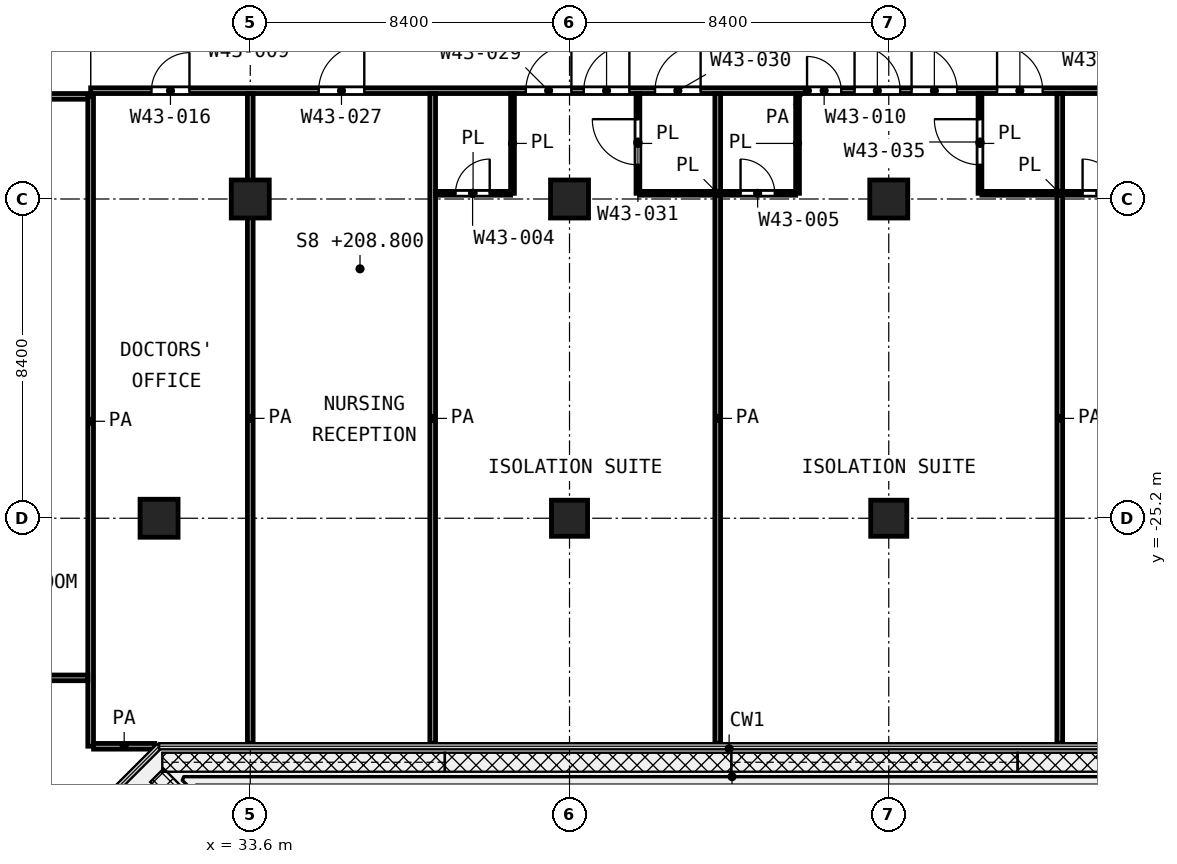
"""IFC4 building model, lengths in metres.
Left out: names, types, materials, properties, quantities, classifications, styles, units other than length and angle.
Written with IfcOpenShell. Run it as: python <this file> out.ifc"""

import sys

from ifc_helpers import new_model, si_unit, direction, frame, frame_2d, origin, origin_2d, place, context, subcontext, project, spatial, rectangle, extrude, element, fill, save


model = new_model("IFC4")
c1 = context("Model", 3, precision=1e-05, world=origin(), true_north=direction((0.0, 1.0)))
c2 = subcontext(c1, "Body", "Model", "MODEL_VIEW")
j1 = project(units=[si_unit("LENGTHUNIT", "METRE"), si_unit("PLANEANGLEUNIT", "RADIAN")], contexts=[c1])
p1 = place(None, origin())
s1 = spatial("IfcSite", under=j1, at=p1, CompositionType="ELEMENT")
p2 = place(p1, origin())
s2 = spatial("IfcBuilding", under=s1, at=p2, CompositionType="ELEMENT")
p3 = place(p2, frame((0.0, 0.0, 208.8)))
s3 = spatial("IfcBuildingStorey", under=s2, at=p3, CompositionType="ELEMENT", Elevation=208.8)
for number, where, z_axis, x_axis in (
    (1, (33.6, -16.8, 0.0), (0.0, 0.0, 1.0), (1.0, 0.0, 0.0)),
    (2, (42.0, -16.8, 0.0), (0.0, 0.0, 1.0), (1.0, 0.0, 0.0)),
    (3, (50.4, -16.8, 0.0), (0.0, 0.0, 1.0), (1.0, 0.0, 0.0)),
    (4, (31.2, -25.2, 0.0), (0.0, 0.0, 1.0), (1.0, 0.0, 0.0)),
):
    element("IfcColumn", number, at=place(p3, frame(where, z_axis=z_axis, x_axis=x_axis)), inside=s3, PredefinedType="COLUMN", context=c2, shape_type="SweptSolid", body=[
        extrude(rectangle(XDim=1.0, YDim=1.0, at=origin_2d()), origin(), (0.0, 0.0, 1.0), 4.2),
    ])
for number, where, z_axis, x_axis in (
    (5, (42.0, -25.2, 0.0), (0.0, 0.0, 1.0), (1.0, 0.0, 0.0)),
    (6, (50.4, -25.2, 0.0), (0.0, 0.0, 1.0), (1.0, 0.0, 0.0)),
):
    element("IfcColumn", number, at=place(p3, frame(where, z_axis=z_axis, x_axis=x_axis)), inside=s3, PredefinedType="COLUMN", context=c2, shape_type="SweptSolid", body=[
        extrude(rectangle(XDim=0.95, YDim=0.95, at=origin_2d()), origin(), (0.0, 0.0, 1.0), 4.2),
    ])
p4 = place(p3, frame((38.475, -16.65, 0.0), z_axis=(0.0, 0.0, 1.0), x_axis=(1.0, 0.0, 0.0)))
e7 = element("IfcWall", 7, at=p4, inside=s3, PredefinedType="PARTITIONING", context=c2, shape_type="SweptSolid", body=[
    extrude(rectangle(XDim=1.975, YDim=0.1, at=frame_2d((0.987, 0.0))), origin(), (0.0, 0.0, 1.0), 3.7),
])
p5 = place(p4, frame((0.525, 0.0, 0.0)))
e8 = element("IfcOpeningElement", 8, at=p5, cuts=e7, PredefinedType="OPENING", context=c2, shape_type="SweptSolid", body=[
    extrude(rectangle(XDim=0.9, YDim=2.1, at=frame_2d((0.45, 1.05))), frame((0.0, 0.06, 0.0), z_axis=(0.0, -1.0, 0.0), x_axis=(1.0, 0.0, 0.0)), (0.0, 0.0, 1.0), 0.12),
])
p6 = place(p3, frame((43.85, -16.65, 0.0), z_axis=(0.0, 0.0, 1.0), x_axis=(1.0, 0.0, 0.0)))
e9 = element("IfcWall", 9, at=p6, inside=s3, PredefinedType="PARTITIONING", context=c2, shape_type="SweptSolid", body=[
    extrude(rectangle(XDim=4.1, YDim=0.1, at=frame_2d((2.05, 0.0))), origin(), (0.0, 0.0, 1.0), 3.7),
])
p7 = place(p6, frame((2.65, 0.0, 0.0)))
e10 = element("IfcOpeningElement", 10, at=p7, cuts=e9, PredefinedType="OPENING", context=c2, shape_type="SweptSolid", body=[
    extrude(rectangle(XDim=0.9, YDim=2.1, at=frame_2d((0.45, 1.05))), frame((0.0, 0.06, 0.0), z_axis=(0.0, -1.0, 0.0), x_axis=(1.0, 0.0, 0.0)), (0.0, 0.0, 1.0), 0.12),
])
p8 = place(p3, frame((52.85, -16.65, 0.0), z_axis=(0.0, 0.0, 1.0), x_axis=(1.0, 0.0, 0.0)))
e11 = element("IfcWall", 11, at=p8, inside=s3, PredefinedType="PARTITIONING", context=c2, shape_type="SweptSolid", body=[
    extrude(rectangle(XDim=4.1, YDim=0.1, at=frame_2d((2.05, 0.0))), origin(), (0.0, 0.0, 1.0), 3.7),
])
p9 = place(p8, frame((2.65, 0.0, 0.0)))
e12 = element("IfcOpeningElement", 12, at=p9, cuts=e11, PredefinedType="OPENING", context=c2, shape_type="SweptSolid", body=[
    extrude(rectangle(XDim=0.9, YDim=2.1, at=frame_2d((0.45, 1.05))), frame((0.0, 0.06, 0.0), z_axis=(0.0, -1.0, 0.0), x_axis=(1.0, 0.0, 0.0)), (0.0, 0.0, 1.0), 0.12),
])
p10 = place(p3, frame((40.5, -16.65, 0.0), z_axis=(0.0, 0.0, 1.0), x_axis=(0.0, 1.0, 0.0)))
e13 = element("IfcWall", 13, at=p10, inside=s3, PredefinedType="PARTITIONING", context=c2, shape_type="SweptSolid", body=[
    extrude(rectangle(XDim=2.625, YDim=0.1, at=frame_2d((1.312, 0.0))), origin(), (0.0, 0.0, 1.0), 3.7),
])
p11 = place(p3, frame((43.8, -16.65, 0.0), z_axis=(0.0, 0.0, 1.0), x_axis=(0.0, 1.0, 0.0)))
e14 = element("IfcWall", 14, at=p11, inside=s3, PredefinedType="PARTITIONING", context=c2, shape_type="SweptSolid", body=[
    extrude(rectangle(XDim=2.625, YDim=0.1, at=frame_2d((1.312, 0.0))), origin(), (0.0, 0.0, 1.0), 3.7),
])
p12 = place(p11, frame((0.75, 0.0, 0.0)))
e15 = element("IfcOpeningElement", 15, at=p12, cuts=e14, PredefinedType="OPENING", context=c2, shape_type="SweptSolid", body=[
    extrude(rectangle(XDim=1.2, YDim=2.1, at=frame_2d((0.6, 1.05))), frame((0.0, 0.06, 0.0), z_axis=(0.0, -1.0, 0.0), x_axis=(1.0, 0.0, 0.0)), (0.0, 0.0, 1.0), 0.12),
])
p13 = place(p3, frame((48.0, -16.65, 0.0), z_axis=(0.0, 0.0, 1.0), x_axis=(0.0, 1.0, 0.0)))
e16 = element("IfcWall", 16, at=p13, inside=s3, PredefinedType="PARTITIONING", context=c2, shape_type="SweptSolid", body=[
    extrude(rectangle(XDim=2.625, YDim=0.1, at=frame_2d((1.312, 0.0))), origin(), (0.0, 0.0, 1.0), 3.7),
])
p14 = place(p3, frame((52.8, -16.65, 0.0), z_axis=(0.0, 0.0, 1.0), x_axis=(0.0, 1.0, 0.0)))
e17 = element("IfcWall", 17, at=p14, inside=s3, PredefinedType="PARTITIONING", context=c2, shape_type="SweptSolid", body=[
    extrude(rectangle(XDim=2.625, YDim=0.1, at=frame_2d((1.312, 0.0))), origin(), (0.0, 0.0, 1.0), 3.7),
])
p15 = place(p14, frame((0.75, 0.0, 0.0)))
e18 = element("IfcOpeningElement", 18, at=p15, cuts=e17, PredefinedType="OPENING", context=c2, shape_type="SweptSolid", body=[
    extrude(rectangle(XDim=1.2, YDim=2.1, at=frame_2d((0.6, 1.05))), frame((0.0, 0.06, 0.0), z_axis=(0.0, -1.0, 0.0), x_axis=(1.0, 0.0, 0.0)), (0.0, 0.0, 1.0), 0.12),
])
p16 = place(p3, frame((29.477, -31.2, 0.0), z_axis=(0.0, 0.0, 1.0), x_axis=(1.0, 0.0, 0.0)))
e19 = element("IfcWall", 19, at=p16, inside=s3, PredefinedType="PARTITIONING", context=c2, shape_type="SweptSolid", body=[
    extrude(rectangle(XDim=1.61, YDim=0.15, at=frame_2d((0.805, 0.0))), origin(), (0.0, 0.0, 1.0), 3.7),
])
p17 = place(p3, frame((14.175, -29.4, 0.0), z_axis=(0.0, 0.0, 1.0), x_axis=(1.0, 0.0, 0.0)))
e20 = element("IfcWall", 20, at=p17, inside=s3, PredefinedType="PARTITIONING", context=c2, shape_type="SweptSolid", body=[
    extrude(rectangle(XDim=15.15, YDim=0.15, at=frame_2d((7.575, 0.0))), origin(), (0.0, 0.0, 1.0), 3.7),
])
p18 = place(p3, frame((24.9, -14.1, 0.0), z_axis=(0.0, 0.0, 1.0), x_axis=(1.0, 0.0, 0.0)))
e21 = element("IfcWall", 21, at=p18, inside=s3, PredefinedType="PARTITIONING", context=c2, shape_type="SweptSolid", body=[
    extrude(rectangle(XDim=4.425, YDim=0.15, at=frame_2d((2.212, 0.0))), origin(), (0.0, 0.0, 1.0), 3.7),
])
p19 = place(p18, frame((1.65, 0.0, 0.0)))
e22 = element("IfcOpeningElement", 22, at=p19, cuts=e21, PredefinedType="OPENING", context=c2, shape_type="SweptSolid", body=[
    extrude(rectangle(XDim=1.5, YDim=2.1, at=frame_2d((0.75, 1.05))), frame((0.0, 0.085, 0.0), z_axis=(0.0, -1.0, 0.0), x_axis=(1.0, 0.0, 0.0)), (0.0, 0.0, 1.0), 0.17),
])
p20 = place(p3, frame((29.4, -13.95, 0.0), z_axis=(0.0, 0.0, 1.0), x_axis=(1.0, 0.0, 0.0)))
e23 = element("IfcWall", 23, at=p20, inside=s3, PredefinedType="PARTITIONING", context=c2, shape_type="SweptSolid", body=[
    extrude(rectangle(XDim=37.72, YDim=0.15, at=frame_2d((18.86, 0.0))), origin(), (0.0, 0.0, 1.0), 3.7),
])
p21 = place(p20, frame((1.6, 0.0, 0.0)))
e24 = element("IfcOpeningElement", 24, at=p21, cuts=e23, PredefinedType="OPENING", context=c2, shape_type="SweptSolid", body=[
    extrude(rectangle(XDim=1.0, YDim=2.1, at=frame_2d((0.5, 1.05))), frame((0.0, 0.085, 0.0), z_axis=(0.0, -1.0, 0.0), x_axis=(1.0, 0.0, 0.0)), (0.0, 0.0, 1.0), 0.17),
])
p22 = place(p20, frame((6.0, 0.0, 0.0)))
e25 = element("IfcOpeningElement", 25, at=p22, cuts=e23, PredefinedType="OPENING", context=c2, shape_type="SweptSolid", body=[
    extrude(rectangle(XDim=1.2, YDim=2.1, at=frame_2d((0.6, 1.05))), frame((0.0, 0.085, 0.0), z_axis=(0.0, -1.0, 0.0), x_axis=(1.0, 0.0, 0.0)), (0.0, 0.0, 1.0), 0.17),
])
p23 = place(p20, frame((12.975, 0.0, 0.0)))
e26 = element("IfcOpeningElement", 26, at=p23, cuts=e23, PredefinedType="OPENING", context=c2, shape_type="SweptSolid", body=[
    extrude(rectangle(XDim=1.2, YDim=2.1, at=frame_2d((0.6, 1.05))), frame((0.0, 0.085, 0.0), z_axis=(0.0, -1.0, 0.0), x_axis=(1.0, 0.0, 0.0)), (0.0, 0.0, 1.0), 0.17),
])
p24 = place(p20, frame((11.45, 0.0, 0.0)))
e27 = element("IfcOpeningElement", 27, at=p24, cuts=e23, PredefinedType="OPENING", context=c2, shape_type="SweptSolid", body=[
    extrude(rectangle(XDim=1.2, YDim=2.1, at=frame_2d((0.6, 1.05))), frame((0.0, 0.085, 0.0), z_axis=(0.0, -1.0, 0.0), x_axis=(1.0, 0.0, 0.0)), (0.0, 0.0, 1.0), 0.17),
])
p25 = place(p20, frame((14.85, 0.0, 0.0)))
e28 = element("IfcOpeningElement", 28, at=p25, cuts=e23, PredefinedType="OPENING", context=c2, shape_type="SweptSolid", body=[
    extrude(rectangle(XDim=1.2, YDim=2.1, at=frame_2d((0.6, 1.05))), frame((0.0, 0.085, 0.0), z_axis=(0.0, -1.0, 0.0), x_axis=(1.0, 0.0, 0.0)), (0.0, 0.0, 1.0), 0.17),
])
p26 = place(p20, frame((21.6, 0.0, 0.0)))
e29 = element("IfcOpeningElement", 29, at=p26, cuts=e23, PredefinedType="OPENING", context=c2, shape_type="SweptSolid", body=[
    extrude(rectangle(XDim=1.2, YDim=2.1, at=frame_2d((0.6, 1.05))), frame((0.0, 0.085, 0.0), z_axis=(0.0, -1.0, 0.0), x_axis=(1.0, 0.0, 0.0)), (0.0, 0.0, 1.0), 0.17),
])
p27 = place(p20, frame((20.1, 0.0, 0.0)))
e30 = element("IfcOpeningElement", 30, at=p27, cuts=e23, PredefinedType="OPENING", context=c2, shape_type="SweptSolid", body=[
    extrude(rectangle(XDim=1.2, YDim=2.1, at=frame_2d((0.6, 1.05))), frame((0.0, 0.085, 0.0), z_axis=(0.0, -1.0, 0.0), x_axis=(1.0, 0.0, 0.0)), (0.0, 0.0, 1.0), 0.17),
])
p28 = place(p20, frame((18.85, 0.0, 0.0)))
e31 = element("IfcOpeningElement", 31, at=p28, cuts=e23, PredefinedType="OPENING", context=c2, shape_type="SweptSolid", body=[
    extrude(rectangle(XDim=0.9, YDim=2.1, at=frame_2d((0.45, 1.05))), frame((0.0, 0.085, 0.0), z_axis=(0.0, -1.0, 0.0), x_axis=(1.0, 0.0, 0.0)), (0.0, 0.0, 1.0), 0.17),
])
p29 = place(p20, frame((23.85, 0.0, 0.0)))
e32 = element("IfcOpeningElement", 32, at=p29, cuts=e23, PredefinedType="OPENING", context=c2, shape_type="SweptSolid", body=[
    extrude(rectangle(XDim=1.2, YDim=2.1, at=frame_2d((0.6, 1.05))), frame((0.0, 0.085, 0.0), z_axis=(0.0, -1.0, 0.0), x_axis=(1.0, 0.0, 0.0)), (0.0, 0.0, 1.0), 0.17),
])
p30 = place(p20, frame((29.475, 0.0, 0.0)))
e33 = element("IfcOpeningElement", 33, at=p30, cuts=e23, PredefinedType="OPENING", context=c2, shape_type="SweptSolid", body=[
    extrude(rectangle(XDim=1.2, YDim=2.1, at=frame_2d((0.6, 1.05))), frame((0.0, 0.085, 0.0), z_axis=(0.0, -1.0, 0.0), x_axis=(1.0, 0.0, 0.0)), (0.0, 0.0, 1.0), 0.17),
])
p31 = place(p20, frame((27.95, 0.0, 0.0)))
e34 = element("IfcOpeningElement", 34, at=p31, cuts=e23, PredefinedType="OPENING", context=c2, shape_type="SweptSolid", body=[
    extrude(rectangle(XDim=1.2, YDim=2.1, at=frame_2d((0.6, 1.05))), frame((0.0, 0.085, 0.0), z_axis=(0.0, -1.0, 0.0), x_axis=(1.0, 0.0, 0.0)), (0.0, 0.0, 1.0), 0.17),
])
p32 = place(p20, frame((31.35, 0.0, 0.0)))
e35 = element("IfcOpeningElement", 35, at=p32, cuts=e23, PredefinedType="OPENING", context=c2, shape_type="SweptSolid", body=[
    extrude(rectangle(XDim=1.2, YDim=2.1, at=frame_2d((0.6, 1.05))), frame((0.0, 0.085, 0.0), z_axis=(0.0, -1.0, 0.0), x_axis=(1.0, 0.0, 0.0)), (0.0, 0.0, 1.0), 0.17),
])
p33 = place(p20, frame((34.9, 0.0, 0.0)))
e36 = element("IfcOpeningElement", 36, at=p33, cuts=e23, PredefinedType="OPENING", context=c2, shape_type="SweptSolid", body=[
    extrude(rectangle(XDim=1.0, YDim=2.1, at=frame_2d((0.5, 1.05))), frame((0.0, 0.085, 0.0), z_axis=(0.0, -1.0, 0.0), x_axis=(1.0, 0.0, 0.0)), (0.0, 0.0, 1.0), 0.17),
])
p34 = place(p3, frame((29.4, -31.198, 0.0), z_axis=(0.0, 0.0, 1.0), x_axis=(0.0, 1.0, 0.0)))
e37 = element("IfcWall", 37, at=p34, inside=s3, PredefinedType="PARTITIONING", context=c2, shape_type="SweptSolid", body=[
    extrude(rectangle(XDim=17.098, YDim=0.15, at=frame_2d((8.549, 0.0))), origin(), (0.0, 0.0, 1.0), 3.7),
])
for number, where, z_axis, x_axis in (
    (38, (33.6, -31.12, 0.0), (0.0, 0.0, 1.0), (0.0, 1.0, 0.0)),
    (39, (38.4, -31.12, 0.0), (0.0, 0.0, 1.0), (0.0, 1.0, 0.0)),
    (40, (45.9, -31.12, 0.0), (0.0, 0.0, 1.0), (0.0, 1.0, 0.0)),
    (41, (54.9, -31.12, 0.0), (0.0, 0.0, 1.0), (0.0, 1.0, 0.0)),
):
    element("IfcWall", number, at=place(p3, frame(where, z_axis=z_axis, x_axis=x_axis)), inside=s3, PredefinedType="PARTITIONING", context=c2, shape_type="SweptSolid", body=[
        extrude(rectangle(XDim=17.095, YDim=0.15, at=frame_2d((8.548, 0.0))), origin(), (0.0, 0.0, 1.0), 3.7),
    ])
p35 = place(p21, origin())
e42 = element("IfcDoor", 42, at=p35, inside=s3, OperationType="SINGLE_SWING_RIGHT", PredefinedType="DOOR", context=c2, shape_type="SweptSolid", body=[
    extrude(rectangle(XDim=1.0, YDim=2.1, at=frame_2d((0.5, 1.05))), frame((0.0, 0.025, 0.0), z_axis=(0.0, -1.0, 0.0), x_axis=(1.0, 0.0, 0.0)), (0.0, 0.0, 1.0), 0.05),
])
fill(e24, e42)
p36 = place(p22, origin())
e43 = element("IfcDoor", 43, at=p36, inside=s3, OperationType="SINGLE_SWING_RIGHT", PredefinedType="DOOR", context=c2, shape_type="SweptSolid", body=[
    extrude(rectangle(XDim=1.2, YDim=2.1, at=frame_2d((0.6, 1.05))), frame((0.0, 0.025, 0.0), z_axis=(0.0, -1.0, 0.0), x_axis=(1.0, 0.0, 0.0)), (0.0, 0.0, 1.0), 0.05),
])
fill(e25, e43)
p37 = place(p23, origin())
e44 = element("IfcDoor", 44, at=p37, inside=s3, OperationType="SINGLE_SWING_RIGHT", PredefinedType="DOOR", context=c2, shape_type="SweptSolid", body=[
    extrude(rectangle(XDim=1.2, YDim=2.1, at=frame_2d((0.6, 1.05))), frame((0.0, 0.025, 0.0), z_axis=(0.0, -1.0, 0.0), x_axis=(1.0, 0.0, 0.0)), (0.0, 0.0, 1.0), 0.05),
])
fill(e26, e44)
p38 = place(p24, origin())
e45 = element("IfcDoor", 45, at=p38, inside=s3, OperationType="SINGLE_SWING_RIGHT", PredefinedType="DOOR", context=c2, shape_type="SweptSolid", body=[
    extrude(rectangle(XDim=1.2, YDim=2.1, at=frame_2d((0.6, 1.05))), frame((0.0, 0.025, 0.0), z_axis=(0.0, -1.0, 0.0), x_axis=(1.0, 0.0, 0.0)), (0.0, 0.0, 1.0), 0.05),
])
fill(e27, e45)
p39 = place(p25, origin())
e46 = element("IfcDoor", 46, at=p39, inside=s3, OperationType="SINGLE_SWING_RIGHT", PredefinedType="DOOR", context=c2, shape_type="SweptSolid", body=[
    extrude(rectangle(XDim=1.2, YDim=2.1, at=frame_2d((0.6, 1.05))), frame((0.0, 0.025, 0.0), z_axis=(0.0, -1.0, 0.0), x_axis=(1.0, 0.0, 0.0)), (0.0, 0.0, 1.0), 0.05),
])
fill(e28, e46)
p40 = place(p12, origin())
e47 = element("IfcDoor", 47, at=p40, inside=s3, OperationType="SINGLE_SWING_RIGHT", PredefinedType="DOOR", context=c2, shape_type="SweptSolid", body=[
    extrude(rectangle(XDim=1.2, YDim=2.1, at=frame_2d((0.6, 1.05))), frame((0.0, 0.025, 0.0), z_axis=(0.0, -1.0, 0.0), x_axis=(1.0, 0.0, 0.0)), (0.0, 0.0, 1.0), 0.05),
])
fill(e15, e47)
p41 = place(p5, origin())
e48 = element("IfcDoor", 48, at=p41, inside=s3, OperationType="SINGLE_SWING_RIGHT", PredefinedType="DOOR", context=c2, shape_type="SweptSolid", body=[
    extrude(rectangle(XDim=0.9, YDim=2.1, at=frame_2d((0.45, 1.05))), frame((0.0, 0.025, 0.0), z_axis=(0.0, -1.0, 0.0), x_axis=(1.0, 0.0, 0.0)), (0.0, 0.0, 1.0), 0.05),
])
fill(e8, e48)
p42 = place(p26, origin())
e49 = element("IfcDoor", 49, at=p42, inside=s3, OperationType="SINGLE_SWING_LEFT", PredefinedType="DOOR", context=c2, shape_type="SweptSolid", body=[
    extrude(rectangle(XDim=1.2, YDim=2.1, at=frame_2d((0.6, 1.05))), frame((0.0, 0.025, 0.0), z_axis=(0.0, -1.0, 0.0), x_axis=(1.0, 0.0, 0.0)), (0.0, 0.0, 1.0), 0.05),
])
fill(e29, e49)
p43 = place(p27, origin())
e50 = element("IfcDoor", 50, at=p43, inside=s3, OperationType="SINGLE_SWING_LEFT", PredefinedType="DOOR", context=c2, shape_type="SweptSolid", body=[
    extrude(rectangle(XDim=1.2, YDim=2.1, at=frame_2d((0.6, 1.05))), frame((0.0, 0.025, 0.0), z_axis=(0.0, -1.0, 0.0), x_axis=(1.0, 0.0, 0.0)), (0.0, 0.0, 1.0), 0.05),
])
fill(e30, e50)
p44 = place(p28, origin())
e51 = element("IfcDoor", 51, at=p44, inside=s3, OperationType="SINGLE_SWING_LEFT", PredefinedType="DOOR", context=c2, shape_type="SweptSolid", body=[
    extrude(rectangle(XDim=0.9, YDim=2.1, at=frame_2d((0.45, 1.05))), frame((0.0, 0.025, 0.0), z_axis=(0.0, -1.0, 0.0), x_axis=(1.0, 0.0, 0.0)), (0.0, 0.0, 1.0), 0.05),
])
fill(e31, e51)
p45 = place(p29, origin())
e52 = element("IfcDoor", 52, at=p45, inside=s3, OperationType="SINGLE_SWING_LEFT", PredefinedType="DOOR", context=c2, shape_type="SweptSolid", body=[
    extrude(rectangle(XDim=1.2, YDim=2.1, at=frame_2d((0.6, 1.05))), frame((0.0, 0.025, 0.0), z_axis=(0.0, -1.0, 0.0), x_axis=(1.0, 0.0, 0.0)), (0.0, 0.0, 1.0), 0.05),
])
fill(e32, e52)
p46 = place(p15, origin())
e53 = element("IfcDoor", 53, at=p46, inside=s3, OperationType="SINGLE_SWING_RIGHT", PredefinedType="DOOR", context=c2, shape_type="SweptSolid", body=[
    extrude(rectangle(XDim=1.2, YDim=2.1, at=frame_2d((0.6, 1.05))), frame((0.0, 0.025, 0.0), z_axis=(0.0, -1.0, 0.0), x_axis=(1.0, 0.0, 0.0)), (0.0, 0.0, 1.0), 0.05),
])
fill(e18, e53)
p47 = place(p7, origin())
e54 = element("IfcDoor", 54, at=p47, inside=s3, OperationType="SINGLE_SWING_LEFT", PredefinedType="DOOR", context=c2, shape_type="SweptSolid", body=[
    extrude(rectangle(XDim=0.9, YDim=2.1, at=frame_2d((0.45, 1.05))), frame((0.0, 0.025, 0.0), z_axis=(0.0, -1.0, 0.0), x_axis=(1.0, 0.0, 0.0)), (0.0, 0.0, 1.0), 0.05),
])
fill(e10, e54)
p48 = place(p9, origin())
e55 = element("IfcDoor", 55, at=p48, inside=s3, OperationType="SINGLE_SWING_LEFT", PredefinedType="DOOR", context=c2, shape_type="SweptSolid", body=[
    extrude(rectangle(XDim=0.9, YDim=2.1, at=frame_2d((0.45, 1.05))), frame((0.0, 0.025, 0.0), z_axis=(0.0, -1.0, 0.0), x_axis=(1.0, 0.0, 0.0)), (0.0, 0.0, 1.0), 0.05),
])
fill(e12, e55)
save(model, sys.argv[1])
